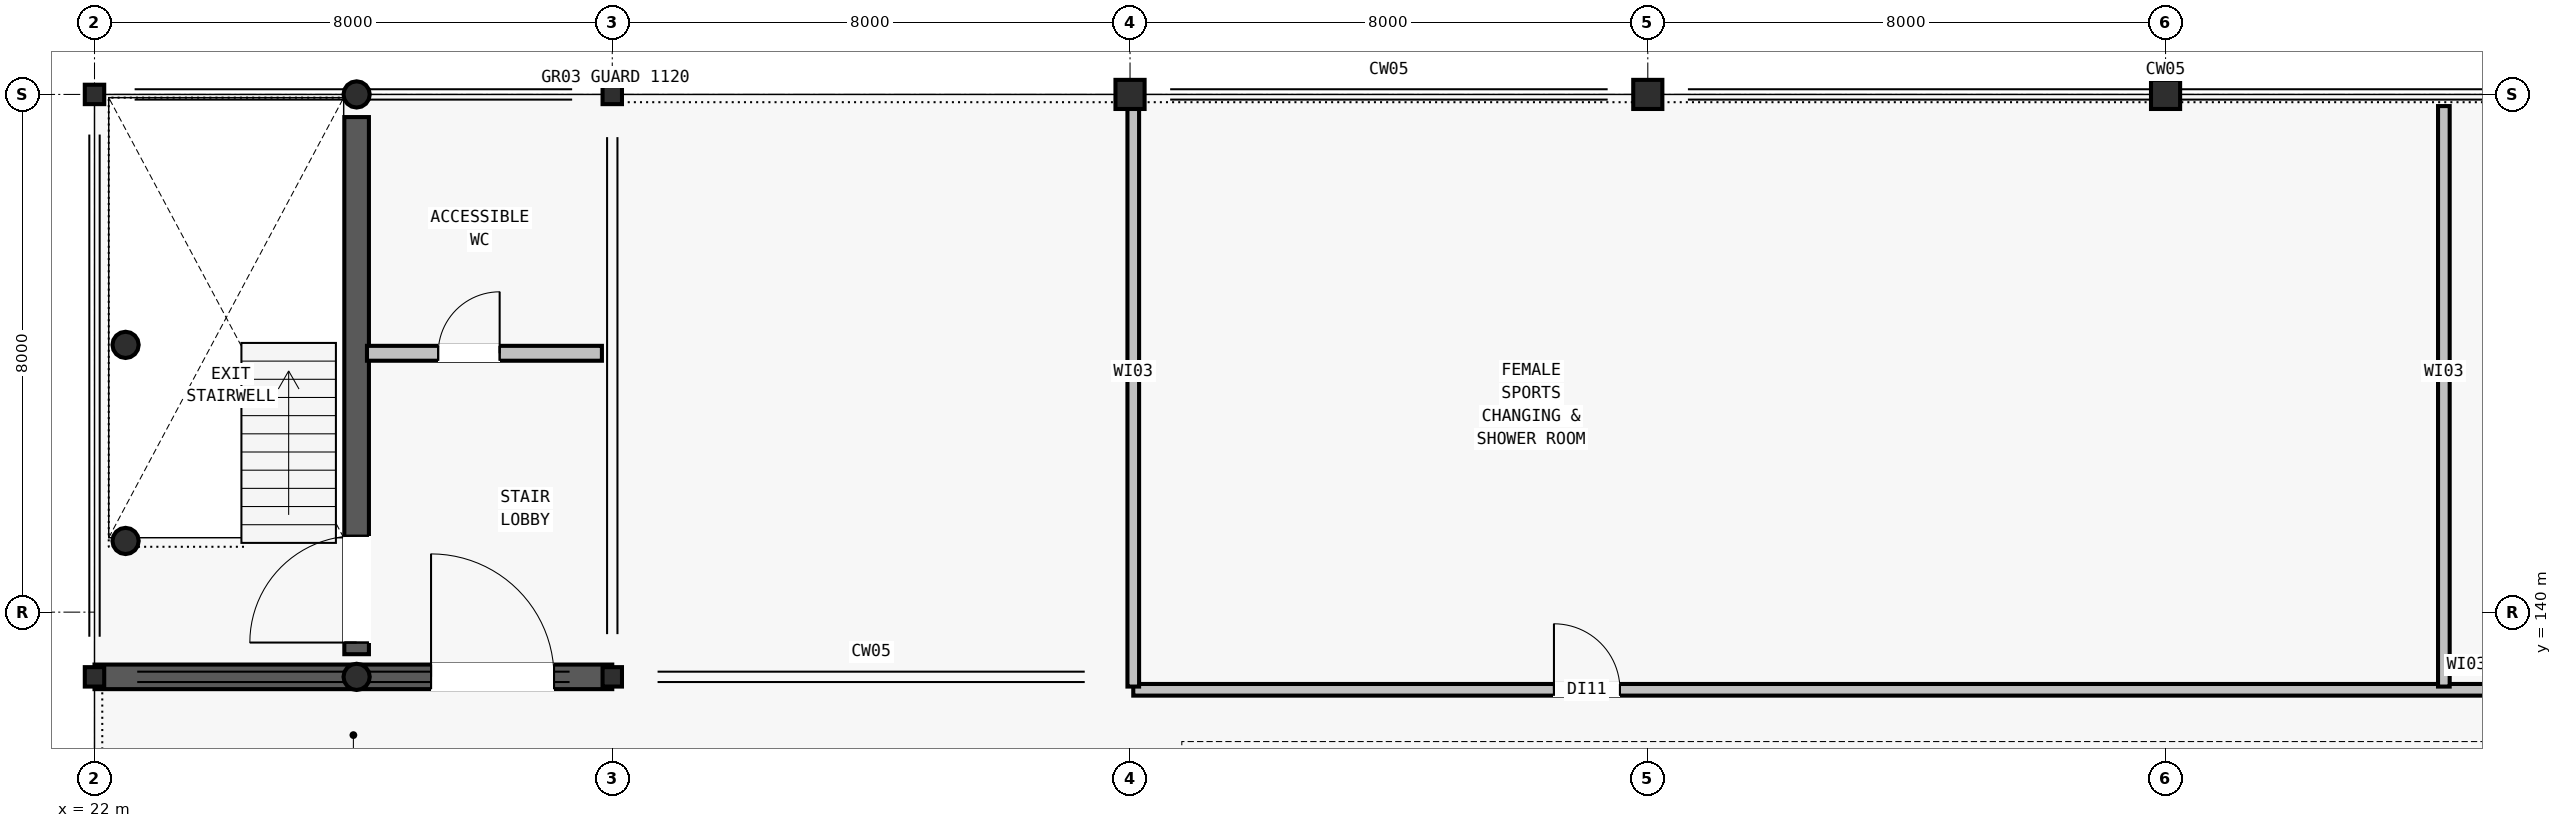
"""IFC4 building model, lengths in metres.
Left out: names, types, materials, properties, quantities, classifications, styles, units other than length and angle.
Written with IfcOpenShell. Run it as: python <this file> out.ifc"""

import sys

from ifc_helpers import new_model, si_unit, direction, frame, frame_2d, origin, origin_2d, place, context, subcontext, project, spatial, rectangle, hollow_circle, i_section, extrude, element, fill, save


model = new_model("IFC4")
c1 = context("Model", 3, precision=1e-05, world=origin(), true_north=direction((0.0, 1.0)))
c2 = subcontext(c1, "Body", "Model", "MODEL_VIEW")
j1 = project(units=[si_unit("LENGTHUNIT", "METRE"), si_unit("PLANEANGLEUNIT", "RADIAN")], contexts=[c1])
p1 = place(None, origin())
s1 = spatial("IfcSite", under=j1, at=p1, CompositionType="ELEMENT")
p2 = place(p1, origin())
s2 = spatial("IfcBuilding", under=s1, at=p2, CompositionType="ELEMENT")
p3 = place(p2, frame((0.0, 0.0, 25.1)))
s3 = spatial("IfcBuildingStorey", under=s2, at=p3, CompositionType="ELEMENT", Elevation=25.1)
for number, where, z_axis, x_axis in (
    (1, (22.0, 148.0, 0.0), (0.0, 0.0, 1.0), (1.0, 0.0, 0.0)),
    (2, (30.0, 148.0, 0.0), (0.0, 0.0, 1.0), (1.0, 0.0, 0.0)),
    (3, (22.0, 139.0, 0.0), (0.0, 0.0, 1.0), (1.0, 0.0, 0.0)),
    (4, (30.0, 139.0, 0.0), (0.0, 0.0, 1.0), (1.0, 0.0, 0.0)),
):
    element("IfcColumn", number, at=place(p3, frame(where, z_axis=z_axis, x_axis=x_axis)), inside=s3, PredefinedType="COLUMN", context=c2, shape_type="SweptSolid", body=[
        extrude(i_section(OverallWidth=0.3, OverallDepth=0.3, WebThickness=0.01, FlangeThickness=0.015, FilletRadius=0.018, at=origin_2d()), origin(), (0.0, 0.0, 1.0), 5.22),
    ])
for number, where, z_axis, x_axis in (
    (5, (26.05, 139.0, 0.0), (0.0, 0.0, 1.0), (1.0, 0.0, 0.0)),
    (6, (26.05, 148.0, 0.0), (0.0, 0.0, 1.0), (1.0, 0.0, 0.0)),
    (7, (22.48, 141.1, 0.0), (0.0, 0.0, 1.0), (1.0, 0.0, 0.0)),
    (8, (22.48, 144.13, 0.0), (0.0, 0.0, 1.0), (1.0, 0.0, 0.0)),
):
    element("IfcColumn", number, at=place(p3, frame(where, z_axis=z_axis, x_axis=x_axis)), inside=s3, PredefinedType="COLUMN", context=c2, shape_type="SweptSolid", body=[
        extrude(hollow_circle(Radius=0.203, WallThickness=0.014, at=origin_2d()), origin(), (0.0, 0.0, 1.0), 5.22),
    ])
for number, where, z_axis, x_axis in (
    (9, (38.0, 148.0, 0.0), (0.0, 0.0, 1.0), (1.0, 0.0, 0.0)),
    (10, (46.0, 148.0, 0.0), (0.0, 0.0, 1.0), (1.0, 0.0, 0.0)),
    (11, (54.0, 148.0, 0.0), (0.0, 0.0, 1.0), (1.0, 0.0, 0.0)),
):
    element("IfcColumn", number, at=place(p3, frame(where, z_axis=z_axis, x_axis=x_axis)), inside=s3, PredefinedType="COLUMN", context=c2, shape_type="SweptSolid", body=[
        extrude(i_section(OverallWidth=0.45, OverallDepth=0.45, WebThickness=0.016, FlangeThickness=0.026, FilletRadius=0.022, at=origin_2d()), origin(), (0.0, 0.0, 1.0), 2.99),
    ])
p4 = place(p3, frame((22.0, 139.0, 0.0), z_axis=(0.0, 0.0, 1.0), x_axis=(1.0, 0.0, 0.0)))
e12 = element("IfcWall", 12, at=p4, inside=s3, PredefinedType="SHEAR", context=c2, shape_type="SweptSolid", body=[
    extrude(rectangle(XDim=8.0, YDim=0.38, at=frame_2d((4.0, 0.0))), origin(), (0.0, 0.0, 1.0), 2.55),
])
p5 = place(p4, frame((5.2, 0.0, 0.0)))
e13 = element("IfcOpeningElement", 13, at=p5, cuts=e12, PredefinedType="OPENING", context=c2, shape_type="SweptSolid", body=[
    extrude(rectangle(XDim=1.9, YDim=2.3, at=frame_2d((0.95, 1.15))), frame((0.0, 0.2, 0.0), z_axis=(0.0, -1.0, 0.0), x_axis=(1.0, 0.0, 0.0)), (0.0, 0.0, 1.0), 0.4),
])
p6 = place(p3, frame((26.05, 139.35, 0.0), z_axis=(0.0, 0.0, 1.0), x_axis=(0.0, 1.0, 0.0)))
e14 = element("IfcWall", 14, at=p6, inside=s3, PredefinedType="SHEAR", context=c2, shape_type="SweptSolid", body=[
    extrude(rectangle(XDim=8.3, YDim=0.38, at=frame_2d((4.15, 0.0))), origin(), (0.0, 0.0, 1.0), 2.55),
])
p7 = place(p6, frame((0.18, 0.0, 0.0)))
e15 = element("IfcOpeningElement", 15, at=p7, cuts=e14, PredefinedType="OPENING", context=c2, shape_type="SweptSolid", body=[
    extrude(rectangle(XDim=1.65, YDim=2.2, at=frame_2d((0.825, 1.1))), frame((0.0, 0.2, 0.0), z_axis=(0.0, -1.0, 0.0), x_axis=(1.0, 0.0, 0.0)), (0.0, 0.0, 1.0), 0.4),
])
p8 = place(p3, frame((26.21, 144.0, 0.0), z_axis=(0.0, 0.0, 1.0), x_axis=(1.0, 0.0, 0.0)))
e16 = element("IfcWall", 16, at=p8, inside=s3, PredefinedType="PARTITIONING", context=c2, shape_type="SweptSolid", body=[
    extrude(rectangle(XDim=3.63, YDim=0.23, at=frame_2d((1.815, 0.0))), origin(), (0.0, 0.0, 1.0), 2.55),
])
p9 = place(p8, frame((1.1, 0.0, 0.0)))
e17 = element("IfcOpeningElement", 17, at=p9, cuts=e16, PredefinedType="OPENING", context=c2, shape_type="SweptSolid", body=[
    extrude(rectangle(XDim=0.95, YDim=2.1, at=frame_2d((0.475, 1.05))), frame((0.0, 0.125, 0.0), z_axis=(0.0, -1.0, 0.0), x_axis=(1.0, 0.0, 0.0)), (0.0, 0.0, 1.0), 0.25),
])
p10 = place(p3, frame((38.05, 138.8, 0.0), z_axis=(0.0, 0.0, 1.0), x_axis=(1.0, 0.0, 0.0)))
e18 = element("IfcWall", 18, at=p10, inside=s3, PredefinedType="PARTITIONING", context=c2, shape_type="SweptSolid", body=[
    extrude(rectangle(XDim=69.83, YDim=0.18, at=frame_2d((34.915, 0.0))), origin(), (0.0, 0.0, 1.0), 2.65),
])
p11 = place(p10, frame((6.5, 0.0, 0.0)))
e19 = element("IfcOpeningElement", 19, at=p11, cuts=e18, PredefinedType="OPENING", context=c2, shape_type="SweptSolid", body=[
    extrude(rectangle(XDim=1.02, YDim=2.1, at=frame_2d((0.51, 1.05))), frame((0.0, 0.1, 0.0), z_axis=(0.0, -1.0, 0.0), x_axis=(1.0, 0.0, 0.0)), (0.0, 0.0, 1.0), 0.2),
])
p12 = place(p10, frame((31.0, 0.0, 0.0)))
e20 = element("IfcOpeningElement", 20, at=p12, cuts=e18, PredefinedType="OPENING", context=c2, shape_type="SweptSolid", body=[
    extrude(rectangle(XDim=1.02, YDim=2.1, at=frame_2d((0.51, 1.05))), frame((0.0, 0.1, 0.0), z_axis=(0.0, -1.0, 0.0), x_axis=(1.0, 0.0, 0.0)), (0.0, 0.0, 1.0), 0.2),
])
p13 = place(p10, frame((53.0, 0.0, 0.0)))
e21 = element("IfcOpeningElement", 21, at=p13, cuts=e18, PredefinedType="OPENING", context=c2, shape_type="SweptSolid", body=[
    extrude(rectangle(XDim=0.96, YDim=2.1, at=frame_2d((0.48, 1.05))), frame((0.0, 0.1, 0.0), z_axis=(0.0, -1.0, 0.0), x_axis=(1.0, 0.0, 0.0)), (0.0, 0.0, 1.0), 0.2),
])
p14 = place(p10, frame((63.5, 0.0, 0.0)))
e22 = element("IfcOpeningElement", 22, at=p14, cuts=e18, PredefinedType="OPENING", context=c2, shape_type="SweptSolid", body=[
    extrude(rectangle(XDim=0.92, YDim=2.05, at=frame_2d((0.46, 1.025))), frame((0.0, 0.1, 0.0), z_axis=(0.0, -1.0, 0.0), x_axis=(1.0, 0.0, 0.0)), (0.0, 0.0, 1.0), 0.2),
])
for number, where, z_axis, x_axis in (
    (23, (38.05, 138.85, 0.0), (0.0, 0.0, 1.0), (0.0, 1.0, 0.0)),
    (24, (58.3, 138.85, 0.0), (0.0, 0.0, 1.0), (0.0, 1.0, 0.0)),
):
    element("IfcWall", number, at=place(p3, frame(where, z_axis=z_axis, x_axis=x_axis)), inside=s3, PredefinedType="PARTITIONING", context=c2, shape_type="SweptSolid", body=[
        extrude(rectangle(XDim=8.97, YDim=0.18, at=frame_2d((4.485, 0.0))), origin(), (0.0, 0.0, 1.0), 2.65),
    ])
p15 = place(p5, origin())
e25 = element("IfcDoor", 25, at=p15, inside=s3, OperationType="SINGLE_SWING_LEFT", PredefinedType="DOOR", context=c2, shape_type="SweptSolid", body=[
    extrude(rectangle(XDim=1.9, YDim=2.3, at=frame_2d((0.95, 1.15))), frame((0.0, 0.025, 0.0), z_axis=(0.0, -1.0, 0.0), x_axis=(1.0, 0.0, 0.0)), (0.0, 0.0, 1.0), 0.05),
])
fill(e13, e25)
p16 = place(p7, origin())
e26 = element("IfcDoor", 26, at=p16, inside=s3, OperationType="SINGLE_SWING_LEFT", PredefinedType="DOOR", context=c2, shape_type="SweptSolid", body=[
    extrude(rectangle(XDim=1.65, YDim=2.2, at=frame_2d((0.825, 1.1))), frame((0.0, 0.025, 0.0), z_axis=(0.0, -1.0, 0.0), x_axis=(1.0, 0.0, 0.0)), (0.0, 0.0, 1.0), 0.05),
])
fill(e15, e26)
p17 = place(p9, origin())
e27 = element("IfcDoor", 27, at=p17, inside=s3, OperationType="SINGLE_SWING_RIGHT", PredefinedType="DOOR", context=c2, shape_type="SweptSolid", body=[
    extrude(rectangle(XDim=0.95, YDim=2.1, at=frame_2d((0.475, 1.05))), frame((0.0, 0.025, 0.0), z_axis=(0.0, -1.0, 0.0), x_axis=(1.0, 0.0, 0.0)), (0.0, 0.0, 1.0), 0.05),
])
fill(e17, e27)
p18 = place(p11, origin())
e28 = element("IfcDoor", 28, at=p18, inside=s3, OperationType="SINGLE_SWING_LEFT", PredefinedType="DOOR", context=c2, shape_type="SweptSolid", body=[
    extrude(rectangle(XDim=1.02, YDim=2.1, at=frame_2d((0.51, 1.05))), frame((0.0, 0.025, 0.0), z_axis=(0.0, -1.0, 0.0), x_axis=(1.0, 0.0, 0.0)), (0.0, 0.0, 1.0), 0.05),
])
fill(e19, e28)
save(model, sys.argv[1])
